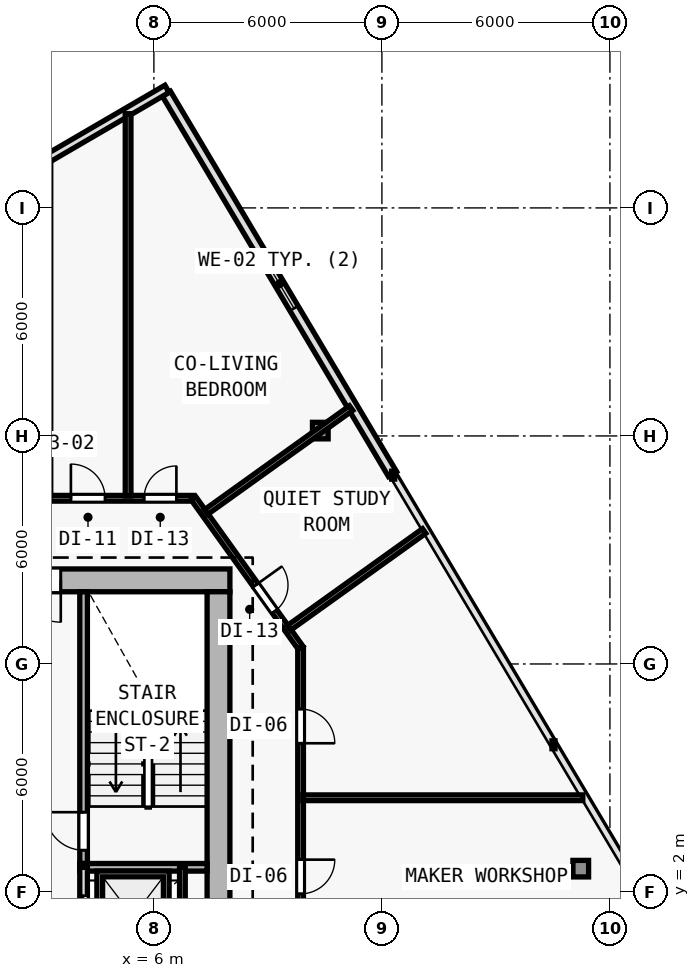
"""IFC4 building model, lengths in metres.
Left out: names, types, materials, properties, quantities, classifications, styles, units other than length and angle.
Written with IfcOpenShell. Run it as: python <this file> out.ifc"""

import sys

from ifc_helpers import new_model, si_unit, direction, frame, frame_2d, origin, origin_2d, place, context, subcontext, project, spatial, rectangle, i_section, extrude, element, fill, save


model = new_model("IFC4")
c1 = context("Model", 3, precision=1e-05, world=origin(), true_north=direction((0.0, 1.0)))
c2 = subcontext(c1, "Body", "Model", "MODEL_VIEW")
j1 = project(units=[si_unit("LENGTHUNIT", "METRE"), si_unit("PLANEANGLEUNIT", "RADIAN")], contexts=[c1])
p1 = place(None, origin())
s1 = spatial("IfcSite", under=j1, at=p1, CompositionType="ELEMENT")
p2 = place(p1, origin())
s2 = spatial("IfcBuilding", under=s1, at=p2, CompositionType="ELEMENT")
p3 = place(p2, frame((0.0, 0.0, 69.6)))
s3 = spatial("IfcBuildingStorey", under=s2, at=p3, CompositionType="ELEMENT", Elevation=69.6)
p4 = place(p3, frame((7.7, 10.2, 0.0), z_axis=(0.0, 0.0, 1.0), x_axis=(1.0, 0.0, 0.0)))
e1 = element("IfcColumn", 1, at=p4, inside=s3, PredefinedType="COLUMN", context=c2, shape_type="SweptSolid", body=[
    extrude(i_section(OverallWidth=0.416, OverallDepth=0.446, WebThickness=0.025, FlangeThickness=0.04, FilletRadius=0.015, at=origin_2d()), origin(), (0.0, 0.0, 1.0), 3.6),
])
p5 = place(p3, frame((17.233, 2.614, 0.005), z_axis=(-0.018906028715, 0.009589028952, 0.999775281052), x_axis=(-0.452339157861, -0.891845999187, 0.0)))
e2 = element("IfcColumn", 2, at=p5, inside=s3, PredefinedType="COLUMN", context=c2, shape_type="SweptSolid", body=[
    extrude(i_section(OverallWidth=0.412, OverallDepth=0.435, WebThickness=0.023, FlangeThickness=0.037, FilletRadius=0.015, at=origin_2d()), origin(), (0.0, 0.0, 1.0), 3.59),
])
p6 = place(p3, frame((10.379, 14.141, 0.005), z_axis=(-0.011767054935, -0.002516653368, 0.999927598816), x_axis=(0.209143047003, -0.977885057607, 0.0)))
e3 = element("IfcColumn", 3, at=p6, inside=s3, PredefinedType="COLUMN", context=c2, shape_type="SweptSolid", body=[
    extrude(i_section(OverallWidth=0.412, OverallDepth=0.435, WebThickness=0.023, FlangeThickness=0.037, FilletRadius=0.015, at=origin_2d()), origin(), (0.0, 0.0, 1.0), 3.589),
])
p7 = place(p3, frame((6.328, 23.006, 0.0), z_axis=(0.0, 0.0, 1.0), x_axis=(0.511075811474, -0.859535639125, 0.0)))
e4 = element("IfcWall", 4, at=p7, inside=s3, PredefinedType="SOLIDWALL", context=c2, shape_type="SweptSolid", body=[
    extrude(rectangle(XDim=11.646, YDim=0.25, at=frame_2d((5.823, 0.0))), origin(), (0.0, 0.0, 1.0), 3.28),
])
p8 = place(p7, frame((5.073, 0.0, 0.62)))
e5 = element("IfcOpeningElement", 5, at=p8, cuts=e4, PredefinedType="OPENING", context=c2, shape_type="SweptSolid", body=[
    extrude(rectangle(XDim=1.5, YDim=2.0, at=frame_2d((0.75, 1.0))), frame((0.0, 0.135, 0.0), z_axis=(0.0, -1.0, 0.0), x_axis=(1.0, 0.0, 0.0)), (0.0, 0.0, 1.0), 0.27),
])
p9 = place(p3, frame((2.193, 20.713, 0.0), z_axis=(0.0, 0.0, 1.0), x_axis=(0.863964978951, 0.503551899159, 0.0)))
e6 = element("IfcWall", 6, at=p9, inside=s3, PredefinedType="SOLIDWALL", context=c2, shape_type="SweptSolid", body=[
    extrude(rectangle(XDim=4.805, YDim=0.22, at=frame_2d((2.402, 0.0))), origin(), (0.0, 0.0, 1.0), 3.28),
])
p10 = place(p3, frame((8.0, 10.2, 0.0), z_axis=(0.0, 0.0, 1.0), x_axis=(-1.0, 0.0, 0.0)))
e7 = element("IfcWall", 7, at=p10, inside=s3, PredefinedType="SHEAR", context=c2, shape_type="SweptSolid", body=[
    extrude(rectangle(XDim=16.0, YDim=0.6, at=frame_2d((8.0, 0.0))), origin(), (0.0, 0.0, 1.0), 3.28),
])
p11 = place(p10, frame((4.45, 0.0, 0.0)))
e8 = element("IfcOpeningElement", 8, at=p11, cuts=e7, PredefinedType="OPENING", context=c2, shape_type="SweptSolid", body=[
    extrude(rectangle(XDim=1.1, YDim=2.15, at=frame_2d((0.55, 1.075))), frame((0.0, 0.31, 0.0), z_axis=(0.0, -1.0, 0.0), x_axis=(1.0, 0.0, 0.0)), (0.0, 0.0, 1.0), 0.62),
])
p12 = place(p3, frame((7.7, 9.9, 0.0), z_axis=(0.0, 0.0, 1.0), x_axis=(0.0, -1.0, 0.0)))
e9 = element("IfcWall", 9, at=p12, inside=s3, PredefinedType="SHEAR", context=c2, shape_type="SweptSolid", body=[
    extrude(rectangle(XDim=19.0, YDim=0.6, at=frame_2d((9.5, 0.0))), origin(), (0.0, 0.0, 1.0), 3.28),
])
p13 = place(p3, frame((4.15, 2.75, 0.0), z_axis=(0.0, 0.0, 1.0), x_axis=(0.0, 1.0, 0.0)))
e10 = element("IfcWall", 10, at=p13, inside=s3, PredefinedType="SOLIDWALL", context=c2, shape_type="SweptSolid", body=[
    extrude(rectangle(XDim=7.15, YDim=0.2, at=frame_2d((3.575, 0.0))), origin(), (0.0, 0.0, 1.0), 3.28),
])
p14 = place(p13, frame((0.35, 0.0, 0.0)))
e11 = element("IfcOpeningElement", 11, at=p14, cuts=e10, PredefinedType="OPENING", context=c2, shape_type="SweptSolid", body=[
    extrude(rectangle(XDim=1.0, YDim=2.15, at=frame_2d((0.5, 1.075))), frame((0.0, 0.11, 0.0), z_axis=(0.0, -1.0, 0.0), x_axis=(1.0, 0.0, 0.0)), (0.0, 0.0, 1.0), 0.22),
])
p15 = place(p3, frame((4.05, 2.65, 0.0), z_axis=(0.0, 0.0, 1.0), x_axis=(1.0, 0.0, 0.0)))
e12 = element("IfcWall", 12, at=p15, inside=s3, PredefinedType="SOLIDWALL", context=c2, shape_type="SweptSolid", body=[
    extrude(rectangle(XDim=3.35, YDim=0.2, at=frame_2d((1.675, 0.0))), origin(), (0.0, 0.0, 1.0), 3.28),
])
p16 = place(p3, frame((4.15, -6.05, 0.0), z_axis=(0.0, 0.0, 1.0), x_axis=(0.0, 1.0, 0.0)))
e13 = element("IfcWall", 13, at=p16, inside=s3, PredefinedType="SOLIDWALL", context=c2, shape_type="SweptSolid", body=[
    extrude(rectangle(XDim=8.7, YDim=0.2, at=frame_2d((4.35, 0.0))), origin(), (0.0, 0.0, 1.0), 3.28),
])
p17 = place(p16, frame((0.55, 0.0, 0.0)))
e14 = element("IfcOpeningElement", 14, at=p17, cuts=e13, PredefinedType="OPENING", context=c2, shape_type="SweptSolid", body=[
    extrude(rectangle(XDim=1.1, YDim=2.15, at=frame_2d((0.55, 1.075))), frame((0.0, 0.11, 0.0), z_axis=(0.0, -1.0, 0.0), x_axis=(1.0, 0.0, 0.0)), (0.0, 0.0, 1.0), 0.22),
])
p18 = place(p16, frame((2.65, 0.0, 0.0)))
e15 = element("IfcOpeningElement", 15, at=p18, cuts=e13, PredefinedType="OPENING", context=c2, shape_type="SweptSolid", body=[
    extrude(rectangle(XDim=1.1, YDim=2.15, at=frame_2d((0.55, 1.075))), frame((0.0, 0.11, 0.0), z_axis=(0.0, -1.0, 0.0), x_axis=(1.0, 0.0, 0.0)), (0.0, 0.0, 1.0), 0.22),
])
p19 = place(p16, frame((4.75, 0.0, 0.0)))
e16 = element("IfcOpeningElement", 16, at=p19, cuts=e13, PredefinedType="OPENING", context=c2, shape_type="SweptSolid", body=[
    extrude(rectangle(XDim=1.1, YDim=2.15, at=frame_2d((0.55, 1.075))), frame((0.0, 0.11, 0.0), z_axis=(0.0, -1.0, 0.0), x_axis=(1.0, 0.0, 0.0)), (0.0, 0.0, 1.0), 0.22),
])
p20 = place(p16, frame((6.85, 0.0, 0.0)))
e17 = element("IfcOpeningElement", 17, at=p20, cuts=e13, PredefinedType="OPENING", context=c2, shape_type="SweptSolid", body=[
    extrude(rectangle(XDim=1.1, YDim=2.15, at=frame_2d((0.55, 1.075))), frame((0.0, 0.11, 0.0), z_axis=(0.0, -1.0, 0.0), x_axis=(1.0, 0.0, 0.0)), (0.0, 0.0, 1.0), 0.22),
])
p21 = place(p3, frame((6.75, -6.05, 0.0), z_axis=(0.0, 0.0, 1.0), x_axis=(0.0, 1.0, 0.0)))
e18 = element("IfcWall", 18, at=p21, inside=s3, PredefinedType="PARTITIONING", context=c2, shape_type="SweptSolid", body=[
    extrude(rectangle(XDim=8.7, YDim=0.15, at=frame_2d((4.35, 0.0))), origin(), (0.0, 0.0, 1.0), 3.28),
])
p22 = place(p3, frame((-7.041, 12.36, 0.0), z_axis=(0.0, 0.0, 1.0), x_axis=(1.0, 0.0, 0.0)))
e19 = element("IfcWall", 19, at=p22, inside=s3, PredefinedType="PARTITIONING", context=c2, shape_type="SweptSolid", body=[
    extrude(rectangle(XDim=14.082, YDim=0.15, at=frame_2d((7.041, 0.0))), origin(), (0.0, 0.0, 1.0), 3.28),
])
p23 = place(p22, frame((12.783, 0.0, 0.0)))
e20 = element("IfcOpeningElement", 20, at=p23, cuts=e19, PredefinedType="OPENING", context=c2, shape_type="SweptSolid", body=[
    extrude(rectangle(XDim=0.85, YDim=2.1, at=frame_2d((0.425, 1.05))), frame((0.0, 0.085, 0.0), z_axis=(0.0, -1.0, 0.0), x_axis=(1.0, 0.0, 0.0)), (0.0, 0.0, 1.0), 0.17),
])
p24 = place(p22, frame((10.857, 0.0, 0.0)))
e21 = element("IfcOpeningElement", 21, at=p24, cuts=e19, PredefinedType="OPENING", context=c2, shape_type="SweptSolid", body=[
    extrude(rectangle(XDim=0.9, YDim=2.1, at=frame_2d((0.45, 1.05))), frame((0.0, 0.085, 0.0), z_axis=(0.0, -1.0, 0.0), x_axis=(1.0, 0.0, 0.0)), (0.0, 0.0, 1.0), 0.17),
])
p25 = place(p22, frame((8.904, 0.0, 0.0)))
e22 = element("IfcOpeningElement", 22, at=p25, cuts=e19, PredefinedType="OPENING", context=c2, shape_type="SweptSolid", body=[
    extrude(rectangle(XDim=0.85, YDim=2.1, at=frame_2d((0.425, 1.05))), frame((0.0, 0.085, 0.0), z_axis=(0.0, -1.0, 0.0), x_axis=(1.0, 0.0, 0.0)), (0.0, 0.0, 1.0), 0.17),
])
p26 = place(p22, frame((6.215, 0.0, 0.0)))
e23 = element("IfcOpeningElement", 23, at=p26, cuts=e19, PredefinedType="OPENING", context=c2, shape_type="SweptSolid", body=[
    extrude(rectangle(XDim=0.9, YDim=2.1, at=frame_2d((0.45, 1.05))), frame((0.0, 0.085, 0.0), z_axis=(0.0, -1.0, 0.0), x_axis=(1.0, 0.0, 0.0)), (0.0, 0.0, 1.0), 0.17),
])
p27 = place(p22, frame((3.768, 0.0, 0.0)))
e24 = element("IfcOpeningElement", 24, at=p27, cuts=e19, PredefinedType="OPENING", context=c2, shape_type="SweptSolid", body=[
    extrude(rectangle(XDim=0.85, YDim=2.1, at=frame_2d((0.425, 1.05))), frame((0.0, 0.085, 0.0), z_axis=(0.0, -1.0, 0.0), x_axis=(1.0, 0.0, 0.0)), (0.0, 0.0, 1.0), 0.17),
])
p28 = place(p22, frame((2.439, 0.0, 0.0)))
e25 = element("IfcOpeningElement", 25, at=p28, cuts=e19, PredefinedType="OPENING", context=c2, shape_type="SweptSolid", body=[
    extrude(rectangle(XDim=0.85, YDim=2.1, at=frame_2d((0.425, 1.05))), frame((0.0, 0.085, 0.0), z_axis=(0.0, -1.0, 0.0), x_axis=(1.0, 0.0, 0.0)), (0.0, 0.0, 1.0), 0.17),
])
p29 = place(p22, frame((0.747, 0.0, 0.0)))
e26 = element("IfcOpeningElement", 26, at=p29, cuts=e19, PredefinedType="OPENING", context=c2, shape_type="SweptSolid", body=[
    extrude(rectangle(XDim=0.9, YDim=2.1, at=frame_2d((0.45, 1.05))), frame((0.0, 0.085, 0.0), z_axis=(0.0, -1.0, 0.0), x_axis=(1.0, 0.0, 0.0)), (0.0, 0.0, 1.0), 0.17),
])
p30 = place(p3, frame((7.041, 12.36, 0.0), z_axis=(0.0, 0.0, 1.0), x_axis=(0.582449511476, -0.812866881218, 0.0)))
e27 = element("IfcWall", 27, at=p30, inside=s3, PredefinedType="PARTITIONING", context=c2, shape_type="SweptSolid", body=[
    extrude(rectangle(XDim=4.84, YDim=0.15, at=frame_2d((2.42, 0.0))), origin(), (0.0, 0.0, 1.0), 2.655),
])
p31 = place(p30, frame((2.812, 0.0, 0.0)))
e28 = element("IfcOpeningElement", 28, at=p31, cuts=e27, PredefinedType="OPENING", context=c2, shape_type="SweptSolid", body=[
    extrude(rectangle(XDim=0.85, YDim=2.1, at=frame_2d((0.425, 1.05))), frame((0.0, 0.085, 0.0), z_axis=(0.0, -1.0, 0.0), x_axis=(1.0, 0.0, 0.0)), (0.0, 0.0, 1.0), 0.17),
])
p32 = place(p3, frame((9.86, 8.426, 0.0), z_axis=(0.0, 0.0, 1.0), x_axis=(0.0, -1.0, 0.0)))
e29 = element("IfcWall", 29, at=p32, inside=s3, PredefinedType="PARTITIONING", context=c2, shape_type="SweptSolid", body=[
    extrude(rectangle(XDim=19.986, YDim=0.15, at=frame_2d((9.993, 0.0))), origin(), (0.0, 0.0, 1.0), 2.539),
])
p33 = place(p32, frame((18.103, 0.0, 0.0)))
e30 = element("IfcOpeningElement", 30, at=p33, cuts=e29, PredefinedType="OPENING", context=c2, shape_type="SweptSolid", body=[
    extrude(rectangle(XDim=0.9, YDim=2.1, at=frame_2d((0.45, 1.05))), frame((0.0, 0.085, 0.0), z_axis=(0.0, -1.0, 0.0), x_axis=(1.0, 0.0, 0.0)), (0.0, 0.0, 1.0), 0.17),
])
p34 = place(p32, frame((14.294, 0.0, 0.0)))
e31 = element("IfcOpeningElement", 31, at=p34, cuts=e29, PredefinedType="OPENING", context=c2, shape_type="SweptSolid", body=[
    extrude(rectangle(XDim=0.9, YDim=2.1, at=frame_2d((0.45, 1.05))), frame((0.0, 0.085, 0.0), z_axis=(0.0, -1.0, 0.0), x_axis=(1.0, 0.0, 0.0)), (0.0, 0.0, 1.0), 0.17),
])
p35 = place(p32, frame((9.696, 0.0, 0.0)))
e32 = element("IfcOpeningElement", 32, at=p35, cuts=e29, PredefinedType="OPENING", context=c2, shape_type="SweptSolid", body=[
    extrude(rectangle(XDim=0.9, YDim=2.1, at=frame_2d((0.45, 1.05))), frame((0.0, 0.085, 0.0), z_axis=(0.0, -1.0, 0.0), x_axis=(1.0, 0.0, 0.0)), (0.0, 0.0, 1.0), 0.17),
])
p36 = place(p32, frame((5.574, 0.0, 0.0)))
e33 = element("IfcOpeningElement", 33, at=p36, cuts=e29, PredefinedType="OPENING", context=c2, shape_type="SweptSolid", body=[
    extrude(rectangle(XDim=0.9, YDim=2.1, at=frame_2d((0.45, 1.05))), frame((0.0, 0.085, 0.0), z_axis=(0.0, -1.0, 0.0), x_axis=(1.0, 0.0, 0.0)), (0.0, 0.0, 1.0), 0.17),
])
p37 = place(p32, frame((1.612, 0.0, 0.0)))
e34 = element("IfcOpeningElement", 34, at=p37, cuts=e29, PredefinedType="OPENING", context=c2, shape_type="SweptSolid", body=[
    extrude(rectangle(XDim=0.9, YDim=2.1, at=frame_2d((0.45, 1.05))), frame((0.0, 0.085, 0.0), z_axis=(0.0, -1.0, 0.0), x_axis=(1.0, 0.0, 0.0)), (0.0, 0.0, 1.0), 0.17),
])
p38 = place(p3, frame((7.374, 11.998, 0.0), z_axis=(0.0, 0.0, 1.0), x_axis=(0.812868021212, 0.582447920497, 0.0)))
e35 = element("IfcWall", 35, at=p38, inside=s3, PredefinedType="PARTITIONING", context=c2, shape_type="SweptSolid", body=[
    extrude(rectangle(XDim=4.694, YDim=0.15, at=frame_2d((2.347, 0.0))), origin(), (0.0, 0.0, 1.0), 2.655),
])
p39 = place(p3, frame((5.321, 12.42, 0.0), z_axis=(0.0, 0.0, 1.0), x_axis=(0.0, 1.0, 0.0)))
e36 = element("IfcWall", 36, at=p39, inside=s3, PredefinedType="PARTITIONING", context=c2, shape_type="SweptSolid", body=[
    extrude(rectangle(XDim=10.059, YDim=0.15, at=frame_2d((5.029, 0.0))), origin(), (0.0, 0.0, 1.0), 2.765),
])
p40 = place(p3, frame((9.92, 4.48, 0.0), z_axis=(0.0, 0.0, 1.0), x_axis=(1.0, 0.0, 0.0)))
e37 = element("IfcWall", 37, at=p40, inside=s3, PredefinedType="PARTITIONING", context=c2, shape_type="SweptSolid", body=[
    extrude(rectangle(XDim=7.366, YDim=0.15, at=frame_2d((3.683, 0.0))), origin(), (0.0, 0.0, 1.0), 2.765),
])
p41 = place(p3, frame((9.557, 8.951, 0.0), z_axis=(0.0, 0.0, 1.0), x_axis=(0.812899056557, 0.582404604935, 0.0)))
e38 = element("IfcWall", 38, at=p41, inside=s3, PredefinedType="PARTITIONING", context=c2, shape_type="SweptSolid", body=[
    extrude(rectangle(XDim=4.374, YDim=0.15, at=frame_2d((2.187, 0.0))), origin(), (0.0, 0.0, 1.0), 2.765),
])
p42 = place(p8, origin())
e39 = element("IfcWindow", 39, at=p42, inside=s3, PartitioningType="SINGLE_PANEL", PredefinedType="WINDOW", context=c2, shape_type="SweptSolid", body=[
    extrude(rectangle(XDim=1.5, YDim=2.0, at=frame_2d((0.75, 1.0))), frame((0.0, 0.03, 0.0), z_axis=(0.0, -1.0, 0.0), x_axis=(1.0, 0.0, 0.0)), (0.0, 0.0, 1.0), 0.06),
])
fill(e5, e39)
p43 = place(p11, origin())
e40 = element("IfcDoor", 40, at=p43, inside=s3, OperationType="SINGLE_SWING_LEFT", PredefinedType="DOOR", context=c2, shape_type="SweptSolid", body=[
    extrude(rectangle(XDim=1.1, YDim=2.15, at=frame_2d((0.55, 1.075))), frame((0.0, 0.025, 0.0), z_axis=(0.0, -1.0, 0.0), x_axis=(1.0, 0.0, 0.0)), (0.0, 0.0, 1.0), 0.05),
])
fill(e8, e40)
p44 = place(p14, origin())
e41 = element("IfcDoor", 41, at=p44, inside=s3, OperationType="SINGLE_SWING_RIGHT", PredefinedType="DOOR", context=c2, shape_type="SweptSolid", body=[
    extrude(rectangle(XDim=1.0, YDim=2.15, at=frame_2d((0.5, 1.075))), frame((0.0, 0.025, 0.0), z_axis=(0.0, -1.0, 0.0), x_axis=(1.0, 0.0, 0.0)), (0.0, 0.0, 1.0), 0.05),
])
fill(e11, e41)
p45 = place(p20, origin())
e42 = element("IfcDoor", 42, at=p45, inside=s3, OperationType="DOUBLE_DOOR_SLIDING", PredefinedType="DOOR", context=c2, shape_type="SweptSolid", body=[
    extrude(rectangle(XDim=1.1, YDim=2.15, at=frame_2d((0.55, 1.075))), frame((0.0, 0.025, 0.0), z_axis=(0.0, -1.0, 0.0), x_axis=(1.0, 0.0, 0.0)), (0.0, 0.0, 1.0), 0.05),
])
fill(e17, e42)
p46 = place(p36, origin())
e43 = element("IfcDoor", 43, at=p46, inside=s3, OperationType="SINGLE_SWING_LEFT", PredefinedType="DOOR", context=c2, shape_type="SweptSolid", body=[
    extrude(rectangle(XDim=0.9, YDim=2.1, at=frame_2d((0.45, 1.05))), frame((0.0, 0.025, 0.0), z_axis=(0.0, -1.0, 0.0), x_axis=(1.0, 0.0, 0.0)), (0.0, 0.0, 1.0), 0.05),
])
fill(e33, e43)
p47 = place(p37, origin())
e44 = element("IfcDoor", 44, at=p47, inside=s3, OperationType="SINGLE_SWING_RIGHT", PredefinedType="DOOR", context=c2, shape_type="SweptSolid", body=[
    extrude(rectangle(XDim=0.9, YDim=2.1, at=frame_2d((0.45, 1.05))), frame((0.0, 0.025, 0.0), z_axis=(0.0, -1.0, 0.0), x_axis=(1.0, 0.0, 0.0)), (0.0, 0.0, 1.0), 0.05),
])
fill(e34, e44)
p48 = place(p31, origin())
e45 = element("IfcDoor", 45, at=p48, inside=s3, OperationType="SINGLE_SWING_LEFT", PredefinedType="DOOR", context=c2, shape_type="SweptSolid", body=[
    extrude(rectangle(XDim=0.85, YDim=2.1, at=frame_2d((0.425, 1.05))), frame((0.0, 0.025, 0.0), z_axis=(0.0, -1.0, 0.0), x_axis=(1.0, 0.0, 0.0)), (0.0, 0.0, 1.0), 0.05),
])
fill(e28, e45)
p49 = place(p23, origin())
e46 = element("IfcDoor", 46, at=p49, inside=s3, OperationType="SINGLE_SWING_RIGHT", PredefinedType="DOOR", context=c2, shape_type="SweptSolid", body=[
    extrude(rectangle(XDim=0.85, YDim=2.1, at=frame_2d((0.425, 1.05))), frame((0.0, 0.025, 0.0), z_axis=(0.0, -1.0, 0.0), x_axis=(1.0, 0.0, 0.0)), (0.0, 0.0, 1.0), 0.05),
])
fill(e20, e46)
p50 = place(p24, origin())
e47 = element("IfcDoor", 47, at=p50, inside=s3, OperationType="SINGLE_SWING_LEFT", PredefinedType="DOOR", context=c2, shape_type="SweptSolid", body=[
    extrude(rectangle(XDim=0.9, YDim=2.1, at=frame_2d((0.45, 1.05))), frame((0.0, 0.025, 0.0), z_axis=(0.0, -1.0, 0.0), x_axis=(1.0, 0.0, 0.0)), (0.0, 0.0, 1.0), 0.05),
])
fill(e21, e47)
save(model, sys.argv[1])
